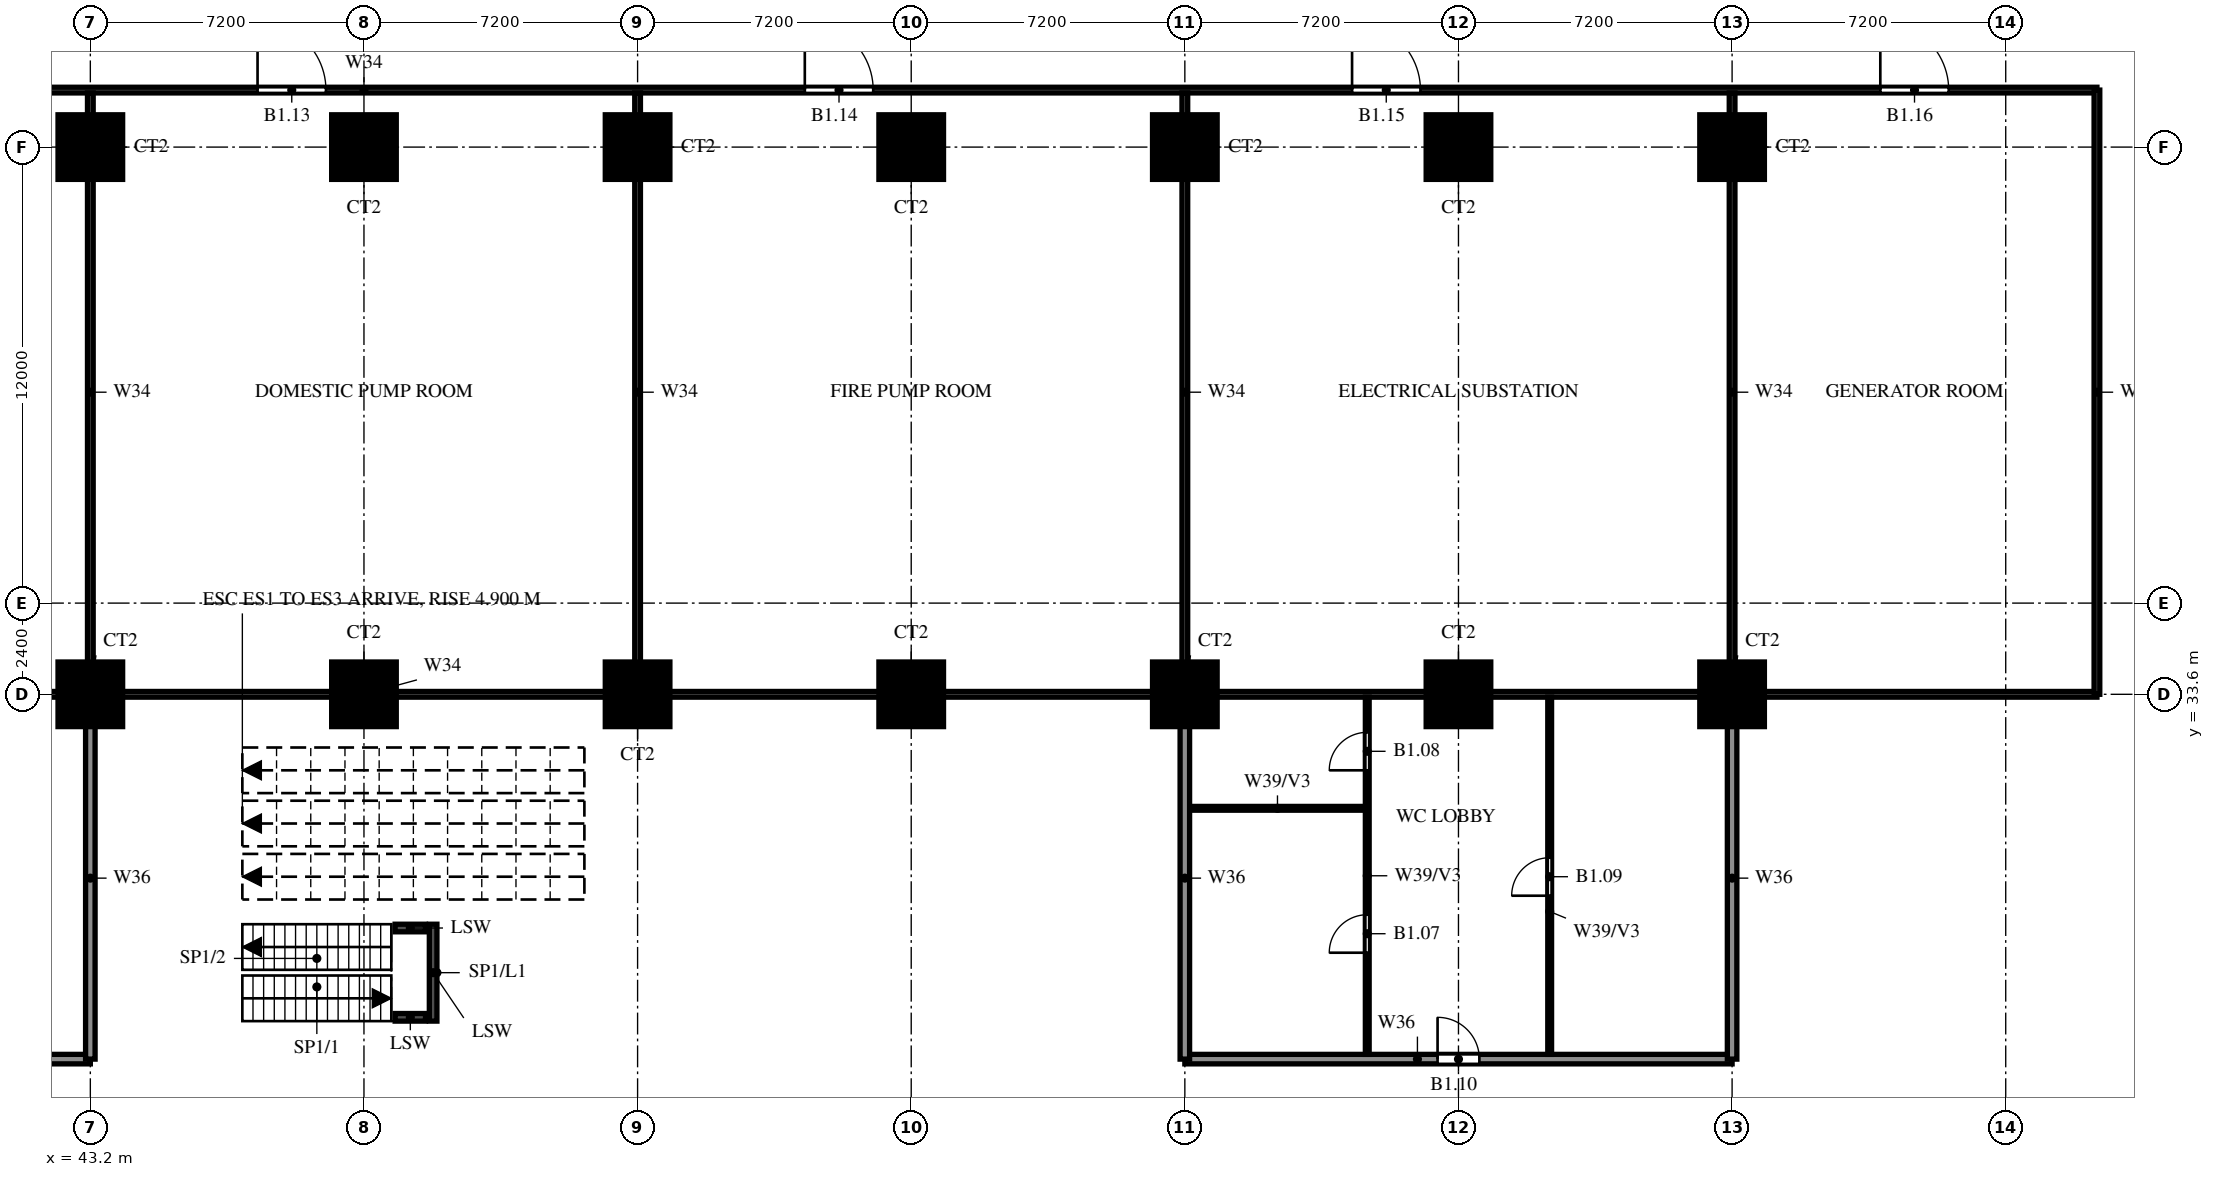
"""IFC4 building model, lengths in metres.
Left out: names, types, materials, properties, quantities, classifications, styles, units other than length and angle.
Written with IfcOpenShell. Run it as: python <this file> out.ifc"""

import sys

from ifc_helpers import new_model, si_unit, direction, frame, frame_2d, origin, origin_2d, place, context, subcontext, project, spatial, rectangle, extrude, source, transform, mapped, element, fill, save


model = new_model("IFC4")
c1 = context("Model", 3, precision=1e-05, world=origin(), true_north=direction((0.0, 1.0)))
c2 = subcontext(c1, "Body", "Model", "MODEL_VIEW")
j1 = project(units=[si_unit("LENGTHUNIT", "METRE"), si_unit("PLANEANGLEUNIT", "RADIAN")], contexts=[c1])
p1 = place(None, origin())
s1 = spatial("IfcSite", under=j1, at=p1, CompositionType="ELEMENT")
p2 = place(p1, origin())
s2 = spatial("IfcBuilding", under=s1, at=p2, CompositionType="ELEMENT")
p3 = place(p2, frame((0.0, 0.0, -5.4)))
s3 = spatial("IfcBuildingStorey", under=s2, at=p3, CompositionType="ELEMENT", Elevation=-5.4)
m1 = source(origin(), c2, "Body", "SweptSolid", [
    extrude(rectangle(XDim=1.7, YDim=1.7, at=origin_2d()), origin(), (0.0, 0.0, 1.0), 5.0),
])
for number, where, z_axis, x_axis in (
    (1, (43.2, 33.6, 0.0), (0.0, 0.0, 1.0), (1.0, 0.0, 0.0)),
    (2, (50.4, 33.6, 0.0), (0.0, 0.0, 1.0), (1.0, 0.0, 0.0)),
    (3, (57.6, 33.6, 0.0), (0.0, 0.0, 1.0), (1.0, 0.0, 0.0)),
    (4, (64.8, 33.6, 0.0), (0.0, 0.0, 1.0), (1.0, 0.0, 0.0)),
    (5, (72.0, 33.6, 0.0), (0.0, 0.0, 1.0), (1.0, 0.0, 0.0)),
    (6, (79.2, 33.6, 0.0), (0.0, 0.0, 1.0), (1.0, 0.0, 0.0)),
    (7, (86.4, 33.6, 0.0), (0.0, 0.0, 1.0), (1.0, 0.0, 0.0)),
    (8, (43.2, 48.0, 0.0), (0.0, 0.0, 1.0), (1.0, 0.0, 0.0)),
    (9, (50.4, 48.0, 0.0), (0.0, 0.0, 1.0), (1.0, 0.0, 0.0)),
    (10, (57.6, 48.0, 0.0), (0.0, 0.0, 1.0), (1.0, 0.0, 0.0)),
    (11, (64.8, 48.0, 0.0), (0.0, 0.0, 1.0), (1.0, 0.0, 0.0)),
    (12, (72.0, 48.0, 0.0), (0.0, 0.0, 1.0), (1.0, 0.0, 0.0)),
    (13, (79.2, 48.0, 0.0), (0.0, 0.0, 1.0), (1.0, 0.0, 0.0)),
    (14, (86.4, 48.0, 0.0), (0.0, 0.0, 1.0), (1.0, 0.0, 0.0)),
):
    element("IfcColumn", number, at=place(p3, frame(where, z_axis=z_axis, x_axis=x_axis)), inside=s3, PredefinedType="COLUMN", context=c2, shape_type="MappedRepresentation", body=[
        mapped(m1, transform((0.0, 0.0, 0.0))),
    ])
for number, where, z_axis, x_axis in (
    (15, (51.22, 25.1, 0.0), (0.0, 0.0, 1.0), (1.0, 0.0, 0.0)),
    (16, (51.22, 27.45, 0.0), (0.0, 0.0, 1.0), (1.0, 0.0, 0.0)),
):
    element("IfcWall", number, at=place(p3, frame(where, z_axis=z_axis, x_axis=x_axis)), inside=s3, PredefinedType="SOLIDWALL", context=c2, shape_type="SweptSolid", body=[
        extrude(rectangle(XDim=0.8, YDim=0.2, at=frame_2d((0.4, 0.0))), origin(), (0.0, 0.0, 1.0), 2.5),
    ])
p4 = place(p3, frame((52.22, 25.0, 0.0), z_axis=(0.0, 0.0, 1.0), x_axis=(0.0, 1.0, 0.0)))
e17 = element("IfcWall", 17, at=p4, inside=s3, PredefinedType="SOLIDWALL", context=c2, shape_type="SweptSolid", body=[
    extrude(rectangle(XDim=2.55, YDim=0.2, at=frame_2d((1.275, 0.0))), origin(), (0.0, 0.0, 1.0), 2.5),
])
p5 = place(p3, frame((14.4, 24.0, 0.0), z_axis=(0.0, 0.0, 1.0), x_axis=(1.0, 0.0, 0.0)))
e18 = element("IfcWall", 18, at=p5, inside=s3, PredefinedType="SOLIDWALL", context=c2, shape_type="SweptSolid", body=[
    extrude(rectangle(XDim=28.8, YDim=0.25, at=frame_2d((14.4, 0.0))), origin(), (0.0, 0.0, 1.0), 3.8),
])
p6 = place(p5, frame((6.7, 0.0, 0.0)))
e19 = element("IfcOpeningElement", 19, at=p6, cuts=e18, PredefinedType="OPENING", context=c2, shape_type="SweptSolid", body=[
    extrude(rectangle(XDim=1.0, YDim=2.1, at=frame_2d((0.5, 1.05))), frame((0.0, 0.135, 0.0), z_axis=(0.0, -1.0, 0.0), x_axis=(1.0, 0.0, 0.0)), (0.0, 0.0, 1.0), 0.27),
])
p7 = place(p5, frame((21.1, 0.0, 0.0)))
e20 = element("IfcOpeningElement", 20, at=p7, cuts=e18, PredefinedType="OPENING", context=c2, shape_type="SweptSolid", body=[
    extrude(rectangle(XDim=1.0, YDim=2.1, at=frame_2d((0.5, 1.05))), frame((0.0, 0.135, 0.0), z_axis=(0.0, -1.0, 0.0), x_axis=(1.0, 0.0, 0.0)), (0.0, 0.0, 1.0), 0.27),
])
p8 = place(p3, frame((72.0, 24.0, 0.0), z_axis=(0.0, 0.0, 1.0), x_axis=(1.0, 0.0, 0.0)))
e21 = element("IfcWall", 21, at=p8, inside=s3, PredefinedType="SOLIDWALL", context=c2, shape_type="SweptSolid", body=[
    extrude(rectangle(XDim=14.4, YDim=0.25, at=frame_2d((7.2, 0.0))), origin(), (0.0, 0.0, 1.0), 3.8),
])
p9 = place(p8, frame((6.65, 0.0, 0.0)))
e22 = element("IfcOpeningElement", 22, at=p9, cuts=e21, PredefinedType="OPENING", context=c2, shape_type="SweptSolid", body=[
    extrude(rectangle(XDim=1.1, YDim=2.1, at=frame_2d((0.55, 1.05))), frame((0.0, 0.135, 0.0), z_axis=(0.0, -1.0, 0.0), x_axis=(1.0, 0.0, 0.0)), (0.0, 0.0, 1.0), 0.27),
])
p10 = place(p3, frame((72.125, 30.6, 0.0), z_axis=(0.0, 0.0, 1.0), x_axis=(1.0, 0.0, 0.0)))
e23 = element("IfcWall", 23, at=p10, inside=s3, PredefinedType="PARTITIONING", context=c2, shape_type="SweptSolid", body=[
    extrude(rectangle(XDim=4.625, YDim=0.1, at=frame_2d((2.312, 0.0))), origin(), (0.0, 0.0, 1.0), 5.0),
])
p11 = place(p3, frame((4.8, 33.6, 0.0), z_axis=(0.0, 0.0, 1.0), x_axis=(1.0, 0.0, 0.0)))
e24 = element("IfcWall", 24, at=p11, inside=s3, PredefinedType="PARTITIONING", context=c2, shape_type="SweptSolid", body=[
    extrude(rectangle(XDim=91.2, YDim=0.15, at=frame_2d((45.6, 0.0))), origin(), (0.0, 0.0, 1.0), 3.8),
])
p12 = place(p3, frame((4.8, 49.5, 0.0), z_axis=(0.0, 0.0, 1.0), x_axis=(1.0, 0.0, 0.0)))
e25 = element("IfcWall", 25, at=p12, inside=s3, PredefinedType="PARTITIONING", context=c2, shape_type="SweptSolid", body=[
    extrude(rectangle(XDim=91.2, YDim=0.15, at=frame_2d((45.6, 0.0))), origin(), (0.0, 0.0, 1.0), 3.8),
])
p13 = place(p12, frame((6.8, 0.0, 0.0)))
e26 = element("IfcOpeningElement", 26, at=p13, cuts=e25, PredefinedType="OPENING", context=c2, shape_type="SweptSolid", body=[
    extrude(rectangle(XDim=1.8, YDim=2.4, at=frame_2d((0.9, 1.2))), frame((0.0, 0.085, 0.0), z_axis=(0.0, -1.0, 0.0), x_axis=(1.0, 0.0, 0.0)), (0.0, 0.0, 1.0), 0.17),
])
p14 = place(p12, frame((27.9, 0.0, 0.0)))
e27 = element("IfcOpeningElement", 27, at=p14, cuts=e25, PredefinedType="OPENING", context=c2, shape_type="SweptSolid", body=[
    extrude(rectangle(XDim=1.8, YDim=2.4, at=frame_2d((0.9, 1.2))), frame((0.0, 0.085, 0.0), z_axis=(0.0, -1.0, 0.0), x_axis=(1.0, 0.0, 0.0)), (0.0, 0.0, 1.0), 0.17),
])
p15 = place(p12, frame((42.8, 0.0, 0.0)))
e28 = element("IfcOpeningElement", 28, at=p15, cuts=e25, PredefinedType="OPENING", context=c2, shape_type="SweptSolid", body=[
    extrude(rectangle(XDim=1.8, YDim=2.4, at=frame_2d((0.9, 1.2))), frame((0.0, 0.085, 0.0), z_axis=(0.0, -1.0, 0.0), x_axis=(1.0, 0.0, 0.0)), (0.0, 0.0, 1.0), 0.17),
])
p16 = place(p12, frame((57.2, 0.0, 0.0)))
e29 = element("IfcOpeningElement", 29, at=p16, cuts=e25, PredefinedType="OPENING", context=c2, shape_type="SweptSolid", body=[
    extrude(rectangle(XDim=1.8, YDim=2.4, at=frame_2d((0.9, 1.2))), frame((0.0, 0.085, 0.0), z_axis=(0.0, -1.0, 0.0), x_axis=(1.0, 0.0, 0.0)), (0.0, 0.0, 1.0), 0.17),
])
p17 = place(p12, frame((71.6, 0.0, 0.0)))
e30 = element("IfcOpeningElement", 30, at=p17, cuts=e25, PredefinedType="OPENING", context=c2, shape_type="SweptSolid", body=[
    extrude(rectangle(XDim=1.8, YDim=2.4, at=frame_2d((0.9, 1.2))), frame((0.0, 0.085, 0.0), z_axis=(0.0, -1.0, 0.0), x_axis=(1.0, 0.0, 0.0)), (0.0, 0.0, 1.0), 0.17),
])
p18 = place(p12, frame((85.5, 0.0, 0.0)))
e31 = element("IfcOpeningElement", 31, at=p18, cuts=e25, PredefinedType="OPENING", context=c2, shape_type="SweptSolid", body=[
    extrude(rectangle(XDim=1.8, YDim=2.4, at=frame_2d((0.9, 1.2))), frame((0.0, 0.085, 0.0), z_axis=(0.0, -1.0, 0.0), x_axis=(1.0, 0.0, 0.0)), (0.0, 0.0, 1.0), 0.17),
])
p19 = place(p3, frame((43.2, 33.675, 0.0), z_axis=(0.0, 0.0, 1.0), x_axis=(0.0, 1.0, 0.0)))
e32 = element("IfcWall", 32, at=p19, inside=s3, PredefinedType="PARTITIONING", context=c2, shape_type="SweptSolid", body=[
    extrude(rectangle(XDim=15.75, YDim=0.15, at=frame_2d((7.875, 0.0))), origin(), (0.0, 0.0, 1.0), 3.8),
])
p20 = place(p3, frame((43.2, 24.0, 0.0), z_axis=(0.0, 0.0, 1.0), x_axis=(0.0, 1.0, 0.0)))
e33 = element("IfcWall", 33, at=p20, inside=s3, PredefinedType="SOLIDWALL", context=c2, shape_type="SweptSolid", body=[
    extrude(rectangle(XDim=9.525, YDim=0.25, at=frame_2d((4.762, 0.0))), origin(), (0.0, 0.0, 1.0), 3.8),
])
for number, where, z_axis, x_axis in (
    (34, (57.6, 33.675, 0.0), (0.0, 0.0, 1.0), (0.0, 1.0, 0.0)),
    (35, (72.0, 33.675, 0.0), (0.0, 0.0, 1.0), (0.0, 1.0, 0.0)),
):
    element("IfcWall", number, at=place(p3, frame(where, z_axis=z_axis, x_axis=x_axis)), inside=s3, PredefinedType="PARTITIONING", context=c2, shape_type="SweptSolid", body=[
        extrude(rectangle(XDim=15.75, YDim=0.15, at=frame_2d((7.875, 0.0))), origin(), (0.0, 0.0, 1.0), 3.8),
    ])
p21 = place(p3, frame((72.0, 24.0, 0.0), z_axis=(0.0, 0.0, 1.0), x_axis=(0.0, 1.0, 0.0)))
e36 = element("IfcWall", 36, at=p21, inside=s3, PredefinedType="SOLIDWALL", context=c2, shape_type="SweptSolid", body=[
    extrude(rectangle(XDim=9.525, YDim=0.25, at=frame_2d((4.762, 0.0))), origin(), (0.0, 0.0, 1.0), 3.8),
])
p22 = place(p3, frame((76.8, 24.125, 0.0), z_axis=(0.0, 0.0, 1.0), x_axis=(0.0, 1.0, 0.0)))
e37 = element("IfcWall", 37, at=p22, inside=s3, PredefinedType="PARTITIONING", context=c2, shape_type="SweptSolid", body=[
    extrude(rectangle(XDim=9.4, YDim=0.1, at=frame_2d((4.7, 0.0))), origin(), (0.0, 0.0, 1.0), 5.0),
])
p23 = place(p22, frame((2.675, 0.0, 0.0)))
e38 = element("IfcOpeningElement", 38, at=p23, cuts=e37, PredefinedType="OPENING", context=c2, shape_type="SweptSolid", body=[
    extrude(rectangle(XDim=1.0, YDim=2.1, at=frame_2d((0.5, 1.05))), frame((0.0, 0.06, 0.0), z_axis=(0.0, -1.0, 0.0), x_axis=(1.0, 0.0, 0.0)), (0.0, 0.0, 1.0), 0.12),
])
p24 = place(p22, frame((7.475, 0.0, 0.0)))
e39 = element("IfcOpeningElement", 39, at=p24, cuts=e37, PredefinedType="OPENING", context=c2, shape_type="SweptSolid", body=[
    extrude(rectangle(XDim=1.0, YDim=2.1, at=frame_2d((0.5, 1.05))), frame((0.0, 0.06, 0.0), z_axis=(0.0, -1.0, 0.0), x_axis=(1.0, 0.0, 0.0)), (0.0, 0.0, 1.0), 0.12),
])
p25 = place(p3, frame((81.6, 24.125, 0.0), z_axis=(0.0, 0.0, 1.0), x_axis=(0.0, 1.0, 0.0)))
e40 = element("IfcWall", 40, at=p25, inside=s3, PredefinedType="PARTITIONING", context=c2, shape_type="SweptSolid", body=[
    extrude(rectangle(XDim=9.4, YDim=0.1, at=frame_2d((4.7, 0.0))), origin(), (0.0, 0.0, 1.0), 5.0),
])
p26 = place(p25, frame((4.175, 0.0, 0.0)))
e41 = element("IfcOpeningElement", 41, at=p26, cuts=e40, PredefinedType="OPENING", context=c2, shape_type="SweptSolid", body=[
    extrude(rectangle(XDim=1.0, YDim=2.1, at=frame_2d((0.5, 1.05))), frame((0.0, 0.06, 0.0), z_axis=(0.0, -1.0, 0.0), x_axis=(1.0, 0.0, 0.0)), (0.0, 0.0, 1.0), 0.12),
])
p27 = place(p3, frame((86.4, 33.675, 0.0), z_axis=(0.0, 0.0, 1.0), x_axis=(0.0, 1.0, 0.0)))
e42 = element("IfcWall", 42, at=p27, inside=s3, PredefinedType="PARTITIONING", context=c2, shape_type="SweptSolid", body=[
    extrude(rectangle(XDim=15.75, YDim=0.15, at=frame_2d((7.875, 0.0))), origin(), (0.0, 0.0, 1.0), 3.8),
])
p28 = place(p3, frame((86.4, 24.0, 0.0), z_axis=(0.0, 0.0, 1.0), x_axis=(0.0, 1.0, 0.0)))
e43 = element("IfcWall", 43, at=p28, inside=s3, PredefinedType="SOLIDWALL", context=c2, shape_type="SweptSolid", body=[
    extrude(rectangle(XDim=9.525, YDim=0.25, at=frame_2d((4.762, 0.0))), origin(), (0.0, 0.0, 1.0), 3.8),
])
p29 = place(p3, frame((96.0, 33.6, 0.0), z_axis=(0.0, 0.0, 1.0), x_axis=(0.0, 1.0, 0.0)))
e44 = element("IfcWall", 44, at=p29, inside=s3, PredefinedType="PARTITIONING", context=c2, shape_type="SweptSolid", body=[
    extrude(rectangle(XDim=15.9, YDim=0.15, at=frame_2d((7.95, 0.0))), origin(), (0.0, 0.0, 1.0), 3.8),
])
p30 = place(p23, origin())
e45 = element("IfcDoor", 45, at=p30, inside=s3, OperationType="SINGLE_SWING_LEFT", PredefinedType="DOOR", context=c2, shape_type="SweptSolid", body=[
    extrude(rectangle(XDim=1.0, YDim=2.1, at=frame_2d((0.5, 1.05))), frame((0.0, 0.025, 0.0), z_axis=(0.0, -1.0, 0.0), x_axis=(1.0, 0.0, 0.0)), (0.0, 0.0, 1.0), 0.05),
])
fill(e38, e45)
p31 = place(p24, origin())
e46 = element("IfcDoor", 46, at=p31, inside=s3, OperationType="SINGLE_SWING_RIGHT", PredefinedType="DOOR", context=c2, shape_type="SweptSolid", body=[
    extrude(rectangle(XDim=1.0, YDim=2.1, at=frame_2d((0.5, 1.05))), frame((0.0, 0.025, 0.0), z_axis=(0.0, -1.0, 0.0), x_axis=(1.0, 0.0, 0.0)), (0.0, 0.0, 1.0), 0.05),
])
fill(e39, e46)
p32 = place(p26, origin())
e47 = element("IfcDoor", 47, at=p32, inside=s3, OperationType="SINGLE_SWING_LEFT", PredefinedType="DOOR", context=c2, shape_type="SweptSolid", body=[
    extrude(rectangle(XDim=1.0, YDim=2.1, at=frame_2d((0.5, 1.05))), frame((0.0, 0.025, 0.0), z_axis=(0.0, -1.0, 0.0), x_axis=(1.0, 0.0, 0.0)), (0.0, 0.0, 1.0), 0.05),
])
fill(e41, e47)
p33 = place(p9, origin())
e48 = element("IfcDoor", 48, at=p33, inside=s3, OperationType="SINGLE_SWING_RIGHT", PredefinedType="DOOR", context=c2, shape_type="SweptSolid", body=[
    extrude(rectangle(XDim=1.1, YDim=2.1, at=frame_2d((0.55, 1.05))), frame((0.0, 0.025, 0.0), z_axis=(0.0, -1.0, 0.0), x_axis=(1.0, 0.0, 0.0)), (0.0, 0.0, 1.0), 0.05),
])
fill(e22, e48)
p34 = place(p15, origin())
e49 = element("IfcDoor", 49, at=p34, inside=s3, OperationType="DOUBLE_DOOR_SINGLE_SWING", PredefinedType="DOOR", context=c2, shape_type="SweptSolid", body=[
    extrude(rectangle(XDim=1.8, YDim=2.4, at=frame_2d((0.9, 1.2))), frame((0.0, 0.025, 0.0), z_axis=(0.0, -1.0, 0.0), x_axis=(1.0, 0.0, 0.0)), (0.0, 0.0, 1.0), 0.05),
])
fill(e28, e49)
p35 = place(p16, origin())
e50 = element("IfcDoor", 50, at=p35, inside=s3, OperationType="DOUBLE_DOOR_SINGLE_SWING", PredefinedType="DOOR", context=c2, shape_type="SweptSolid", body=[
    extrude(rectangle(XDim=1.8, YDim=2.4, at=frame_2d((0.9, 1.2))), frame((0.0, 0.025, 0.0), z_axis=(0.0, -1.0, 0.0), x_axis=(1.0, 0.0, 0.0)), (0.0, 0.0, 1.0), 0.05),
])
fill(e29, e50)
p36 = place(p17, origin())
e51 = element("IfcDoor", 51, at=p36, inside=s3, OperationType="DOUBLE_DOOR_SINGLE_SWING", PredefinedType="DOOR", context=c2, shape_type="SweptSolid", body=[
    extrude(rectangle(XDim=1.8, YDim=2.4, at=frame_2d((0.9, 1.2))), frame((0.0, 0.025, 0.0), z_axis=(0.0, -1.0, 0.0), x_axis=(1.0, 0.0, 0.0)), (0.0, 0.0, 1.0), 0.05),
])
fill(e30, e51)
p37 = place(p18, origin())
e52 = element("IfcDoor", 52, at=p37, inside=s3, OperationType="DOUBLE_DOOR_SINGLE_SWING", PredefinedType="DOOR", context=c2, shape_type="SweptSolid", body=[
    extrude(rectangle(XDim=1.8, YDim=2.4, at=frame_2d((0.9, 1.2))), frame((0.0, 0.025, 0.0), z_axis=(0.0, -1.0, 0.0), x_axis=(1.0, 0.0, 0.0)), (0.0, 0.0, 1.0), 0.05),
])
fill(e31, e52)
save(model, sys.argv[1])
